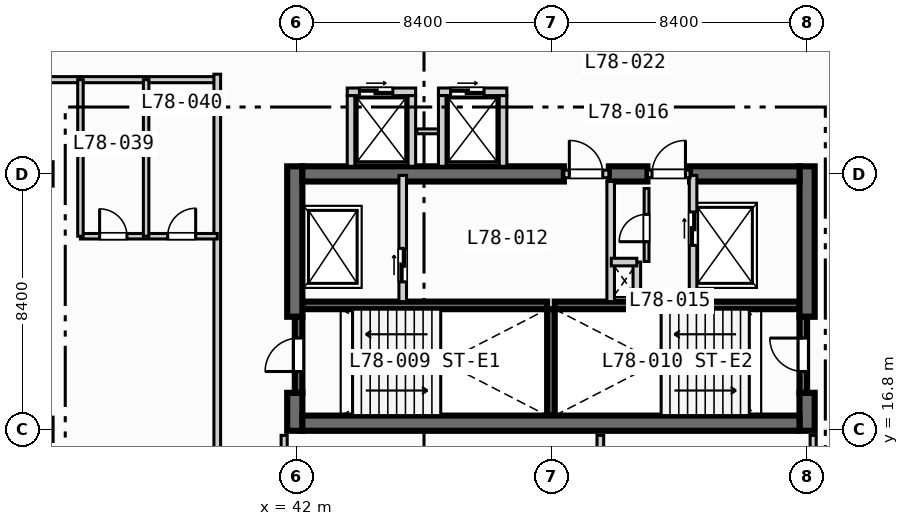
"""IFC4 building model, lengths in metres.
Left out: names, types, materials, properties, quantities, classifications, styles, units other than length and angle.
Written with IfcOpenShell. Run it as: python <this file> out.ifc"""

import sys

from ifc_helpers import new_model, si_unit, direction, frame, frame_2d, origin, place, context, subcontext, project, spatial, rectangle, extrude, element, fill, save


model = new_model("IFC4")
c1 = context("Model", 3, precision=1e-05, world=origin(), true_north=direction((0.0, 1.0)))
c2 = subcontext(c1, "Body", "Model", "MODEL_VIEW")
j1 = project(units=[si_unit("LENGTHUNIT", "METRE"), si_unit("PLANEANGLEUNIT", "RADIAN")], contexts=[c1])
p1 = place(None, origin())
s1 = spatial("IfcSite", under=j1, at=p1, CompositionType="ELEMENT")
p2 = place(p1, origin())
s2 = spatial("IfcBuilding", under=s1, at=p2, CompositionType="ELEMENT")
p3 = place(p2, frame((0.0, 0.0, 316.4)))
s3 = spatial("IfcBuildingStorey", under=s2, at=p3, CompositionType="ELEMENT", Elevation=316.4)
for number, where, z_axis, x_axis in (
    (1, (42.2, 20.875, 0.0), (0.0, 0.0, 1.0), (1.0, 0.0, 0.0)),
    (2, (50.5, 20.875, 0.0), (0.0, 0.0, 1.0), (1.0, 0.0, 0.0)),
):
    element("IfcWall", number, at=place(p3, frame(where, z_axis=z_axis, x_axis=x_axis)), inside=s3, PredefinedType="SOLIDWALL", context=c2, shape_type="SweptSolid", body=[
        extrude(rectangle(XDim=8.05, YDim=0.25, at=frame_2d((4.025, 0.0))), origin(), (0.0, 0.0, 1.0), 3.67),
    ])
p4 = place(p3, frame((50.375, 17.25, 0.0), z_axis=(0.0, 0.0, 1.0), x_axis=(0.0, 1.0, 0.0)))
e3 = element("IfcWall", 3, at=p4, inside=s3, PredefinedType="SOLIDWALL", context=c2, shape_type="SweptSolid", body=[
    extrude(rectangle(XDim=3.5, YDim=0.25, at=frame_2d((1.75, 0.0))), origin(), (0.0, 0.0, 1.0), 3.67),
])
p5 = place(p3, frame((41.95, 16.75, 0.0), z_axis=(0.0, 0.0, 1.0), x_axis=(0.0, 1.0, 0.0)))
e4 = element("IfcWall", 4, at=p5, inside=s3, PredefinedType="SHEAR", context=c2, shape_type="SweptSolid", body=[
    extrude(rectangle(XDim=1.25, YDim=0.5, at=frame_2d((0.625, 0.0))), origin(), (0.0, 0.0, 1.0), 3.67),
])
p6 = place(p3, frame((41.95, 20.5, 0.0), z_axis=(0.0, 0.0, 1.0), x_axis=(0.0, 1.0, 0.0)))
e5 = element("IfcWall", 5, at=p6, inside=s3, PredefinedType="SHEAR", context=c2, shape_type="SweptSolid", body=[
    extrude(rectangle(XDim=4.95, YDim=0.5, at=frame_2d((2.475, 0.0))), origin(), (0.0, 0.0, 1.0), 3.67),
])
p7 = place(p3, frame((58.8, 16.75, 0.0), z_axis=(0.0, 0.0, 1.0), x_axis=(0.0, 1.0, 0.0)))
e6 = element("IfcWall", 6, at=p7, inside=s3, PredefinedType="SHEAR", context=c2, shape_type="SweptSolid", body=[
    extrude(rectangle(XDim=1.25, YDim=0.5, at=frame_2d((0.625, 0.0))), origin(), (0.0, 0.0, 1.0), 3.67),
])
p8 = place(p3, frame((58.8, 20.5, 0.0), z_axis=(0.0, 0.0, 1.0), x_axis=(0.0, 1.0, 0.0)))
e7 = element("IfcWall", 7, at=p8, inside=s3, PredefinedType="SHEAR", context=c2, shape_type="SweptSolid", body=[
    extrude(rectangle(XDim=4.95, YDim=0.5, at=frame_2d((2.475, 0.0))), origin(), (0.0, 0.0, 1.0), 3.67),
])
p9 = place(p3, frame((42.2, 17.0, 0.0), z_axis=(0.0, 0.0, 1.0), x_axis=(1.0, 0.0, 0.0)))
e8 = element("IfcWall", 8, at=p9, inside=s3, PredefinedType="SHEAR", context=c2, shape_type="SweptSolid", body=[
    extrude(rectangle(XDim=16.35, YDim=0.5, at=frame_2d((8.175, 0.0))), origin(), (0.0, 0.0, 1.0), 3.67),
])
p10 = place(p3, frame((42.2, 25.2, 0.0), z_axis=(0.0, 0.0, 1.0), x_axis=(1.0, 0.0, 0.0)))
e9 = element("IfcWall", 9, at=p10, inside=s3, PredefinedType="SHEAR", context=c2, shape_type="SweptSolid", body=[
    extrude(rectangle(XDim=8.6, YDim=0.5, at=frame_2d((4.3, 0.0))), origin(), (0.0, 0.0, 1.0), 3.67),
])
p11 = place(p3, frame((52.28, 25.2, 0.0), z_axis=(0.0, 0.0, 1.0), x_axis=(1.0, 0.0, 0.0)))
e10 = element("IfcWall", 10, at=p11, inside=s3, PredefinedType="SHEAR", context=c2, shape_type="SweptSolid", body=[
    extrude(rectangle(XDim=1.27, YDim=0.5, at=frame_2d((0.635, 0.0))), origin(), (0.0, 0.0, 1.0), 3.67),
])
p12 = place(p3, frame((54.95, 25.2, 0.0), z_axis=(0.0, 0.0, 1.0), x_axis=(1.0, 0.0, 0.0)))
e11 = element("IfcWall", 11, at=p12, inside=s3, PredefinedType="SHEAR", context=c2, shape_type="SweptSolid", body=[
    extrude(rectangle(XDim=3.6, YDim=0.5, at=frame_2d((1.8, 0.0))), origin(), (0.0, 0.0, 1.0), 3.67),
])
p13 = place(p3, frame((42.075, 18.0, 0.0), z_axis=(0.0, 0.0, 1.0), x_axis=(0.0, 1.0, 0.0)))
e12 = element("IfcWall", 12, at=p13, inside=s3, PredefinedType="SOLIDWALL", context=c2, shape_type="SweptSolid", body=[
    extrude(rectangle(XDim=2.5, YDim=0.25, at=frame_2d((1.25, 0.0))), origin(), (0.0, 0.0, 1.0), 3.67),
])
p14 = place(p13, frame((0.7, 0.0, 0.0)))
e13 = element("IfcOpeningElement", 13, at=p14, cuts=e12, PredefinedType="OPENING", context=c2, shape_type="SweptSolid", body=[
    extrude(rectangle(XDim=1.1, YDim=2.15, at=frame_2d((0.55, 1.075))), frame((0.0, 0.135, 0.0), z_axis=(0.0, -1.0, 0.0), x_axis=(1.0, 0.0, 0.0)), (0.0, 0.0, 1.0), 0.27),
])
p15 = place(p3, frame((58.675, 18.0, 0.0), z_axis=(0.0, 0.0, 1.0), x_axis=(0.0, 1.0, 0.0)))
e14 = element("IfcWall", 14, at=p15, inside=s3, PredefinedType="SOLIDWALL", context=c2, shape_type="SweptSolid", body=[
    extrude(rectangle(XDim=2.5, YDim=0.25, at=frame_2d((1.25, 0.0))), origin(), (0.0, 0.0, 1.0), 3.67),
])
p16 = place(p15, frame((0.7, 0.0, 0.0)))
e15 = element("IfcOpeningElement", 15, at=p16, cuts=e14, PredefinedType="OPENING", context=c2, shape_type="SweptSolid", body=[
    extrude(rectangle(XDim=1.1, YDim=2.15, at=frame_2d((0.55, 1.075))), frame((0.0, 0.135, 0.0), z_axis=(0.0, -1.0, 0.0), x_axis=(1.0, 0.0, 0.0)), (0.0, 0.0, 1.0), 0.27),
])
p17 = place(p3, frame((45.5, 21.0, 0.0), z_axis=(0.0, 0.0, 1.0), x_axis=(0.0, 1.0, 0.0)))
e16 = element("IfcWall", 16, at=p17, inside=s3, PredefinedType="SOLIDWALL", context=c2, shape_type="SweptSolid", body=[
    extrude(rectangle(XDim=4.15, YDim=0.25, at=frame_2d((2.075, 0.0))), origin(), (0.0, 0.0, 1.0), 3.67),
])
p18 = place(p17, frame((0.65, 0.0, 0.0)))
e17 = element("IfcOpeningElement", 17, at=p18, cuts=e16, PredefinedType="OPENING", context=c2, shape_type="SweptSolid", body=[
    extrude(rectangle(XDim=1.1, YDim=2.15, at=frame_2d((0.55, 1.075))), frame((0.0, 0.135, 0.0), z_axis=(0.0, -1.0, 0.0), x_axis=(1.0, 0.0, 0.0)), (0.0, 0.0, 1.0), 0.27),
])
p19 = place(p3, frame((50.8, 25.2, 0.0), z_axis=(0.0, 0.0, 1.0), x_axis=(1.0, 0.0, 0.0)))
e18 = element("IfcWall", 18, at=p19, inside=s3, PredefinedType="SOLIDWALL", context=c2, shape_type="SweptSolid", body=[
    extrude(rectangle(XDim=1.48, YDim=0.25, at=frame_2d((0.74, 0.0))), origin(), (0.0, 0.0, 1.0), 3.67),
])
p20 = place(p19, frame((0.18, 0.0, 0.0)))
e19 = element("IfcOpeningElement", 19, at=p20, cuts=e18, PredefinedType="OPENING", context=c2, shape_type="SweptSolid", body=[
    extrude(rectangle(XDim=1.1, YDim=2.15, at=frame_2d((0.55, 1.075))), frame((0.0, 0.135, 0.0), z_axis=(0.0, -1.0, 0.0), x_axis=(1.0, 0.0, 0.0)), (0.0, 0.0, 1.0), 0.27),
])
p21 = place(p3, frame((52.34, 21.0, 0.0), z_axis=(0.0, 0.0, 1.0), x_axis=(0.0, 1.0, 0.0)))
e20 = element("IfcWall", 20, at=p21, inside=s3, PredefinedType="SOLIDWALL", context=c2, shape_type="SweptSolid", body=[
    extrude(rectangle(XDim=3.95, YDim=0.25, at=frame_2d((1.975, 0.0))), origin(), (0.0, 0.0, 1.0), 3.67),
])
p22 = place(p3, frame((55.05, 21.0, 0.0), z_axis=(0.0, 0.0, 1.0), x_axis=(0.0, 1.0, 0.0)))
e21 = element("IfcWall", 21, at=p22, inside=s3, PredefinedType="SOLIDWALL", context=c2, shape_type="SweptSolid", body=[
    extrude(rectangle(XDim=4.15, YDim=0.25, at=frame_2d((2.075, 0.0))), origin(), (0.0, 0.0, 1.0), 3.67),
])
p23 = place(p22, frame((1.85, 0.0, 0.0)))
e22 = element("IfcOpeningElement", 22, at=p23, cuts=e21, PredefinedType="OPENING", context=c2, shape_type="SweptSolid", body=[
    extrude(rectangle(XDim=1.1, YDim=2.15, at=frame_2d((0.55, 1.075))), frame((0.0, 0.135, 0.0), z_axis=(0.0, -1.0, 0.0), x_axis=(1.0, 0.0, 0.0)), (0.0, 0.0, 1.0), 0.27),
])
p24 = place(p3, frame((53.55, 25.2, 0.0), z_axis=(0.0, 0.0, 1.0), x_axis=(1.0, 0.0, 0.0)))
e23 = element("IfcWall", 23, at=p24, inside=s3, PredefinedType="SOLIDWALL", context=c2, shape_type="SweptSolid", body=[
    extrude(rectangle(XDim=1.4, YDim=0.25, at=frame_2d((0.7, 0.0))), origin(), (0.0, 0.0, 1.0), 3.67),
])
p25 = place(p24, frame((0.15, 0.0, 0.0)))
e24 = element("IfcOpeningElement", 24, at=p25, cuts=e23, PredefinedType="OPENING", context=c2, shape_type="SweptSolid", body=[
    extrude(rectangle(XDim=1.1, YDim=2.15, at=frame_2d((0.55, 1.075))), frame((0.0, 0.135, 0.0), z_axis=(0.0, -1.0, 0.0), x_axis=(1.0, 0.0, 0.0)), (0.0, 0.0, 1.0), 0.27),
])
p26 = place(p3, frame((53.2, 21.0, 0.0), z_axis=(0.0, 0.0, 1.0), x_axis=(0.0, 1.0, 0.0)))
e25 = element("IfcWall", 25, at=p26, inside=s3, PredefinedType="SOLIDWALL", context=c2, shape_type="SweptSolid", body=[
    extrude(rectangle(XDim=1.3, YDim=0.25, at=frame_2d((0.65, 0.0))), origin(), (0.0, 0.0, 1.0), 3.67),
])
p27 = place(p3, frame((52.36, 22.3, 0.0), z_axis=(0.0, 0.0, 1.0), x_axis=(1.0, 0.0, 0.0)))
e26 = element("IfcWall", 26, at=p27, inside=s3, PredefinedType="SOLIDWALL", context=c2, shape_type="SweptSolid", body=[
    extrude(rectangle(XDim=0.84, YDim=0.25, at=frame_2d((0.42, 0.0))), origin(), (0.0, 0.0, 1.0), 3.67),
])
p28 = place(p3, frame((53.52, 22.32, 0.0), z_axis=(0.0, 0.0, 1.0), x_axis=(0.0, 1.0, 0.0)))
e27 = element("IfcWall", 27, at=p28, inside=s3, PredefinedType="PARTITIONING", context=c2, shape_type="SweptSolid", body=[
    extrude(rectangle(XDim=2.4, YDim=0.16, at=frame_2d((1.2, 0.0))), origin(), (0.0, 0.0, 1.0), 3.67),
])
p29 = place(p28, frame((0.65, 0.0, 0.0)))
e28 = element("IfcOpeningElement", 28, at=p29, cuts=e27, PredefinedType="OPENING", context=c2, shape_type="SweptSolid", body=[
    extrude(rectangle(XDim=0.9, YDim=2.1, at=frame_2d((0.45, 1.05))), frame((0.0, 0.09, 0.0), z_axis=(0.0, -1.0, 0.0), x_axis=(1.0, 0.0, 0.0)), (0.0, 0.0, 1.0), 0.18),
])
p30 = place(p3, frame((43.675, 27.9, 0.0), z_axis=(0.0, 0.0, 1.0), x_axis=(1.0, 0.0, 0.0)))
e29 = element("IfcWall", 29, at=p30, inside=s3, PredefinedType="SOLIDWALL", context=c2, shape_type="SweptSolid", body=[
    extrude(rectangle(XDim=2.25, YDim=0.25, at=frame_2d((1.125, 0.0))), origin(), (0.0, 0.0, 1.0), 3.67),
])
p31 = place(p30, frame((0.4, 0.0, 0.0)))
e30 = element("IfcOpeningElement", 30, at=p31, cuts=e29, PredefinedType="OPENING", context=c2, shape_type="SweptSolid", body=[
    extrude(rectangle(XDim=1.1, YDim=2.15, at=frame_2d((0.55, 1.075))), frame((0.0, 0.135, 0.0), z_axis=(0.0, -1.0, 0.0), x_axis=(1.0, 0.0, 0.0)), (0.0, 0.0, 1.0), 0.27),
])
for number, where, z_axis, x_axis in (
    (31, (43.8, 25.45, 0.0), (0.0, 0.0, 1.0), (0.0, 1.0, 0.0)),
    (32, (45.8, 25.45, 0.0), (0.0, 0.0, 1.0), (0.0, 1.0, 0.0)),
):
    element("IfcWall", number, at=place(p3, frame(where, z_axis=z_axis, x_axis=x_axis)), inside=s3, PredefinedType="SOLIDWALL", context=c2, shape_type="SweptSolid", body=[
        extrude(rectangle(XDim=2.325, YDim=0.25, at=frame_2d((1.163, 0.0))), origin(), (0.0, 0.0, 1.0), 3.67),
    ])
p32 = place(p3, frame((45.96, 26.6, 0.0), z_axis=(0.0, 0.0, 1.0), x_axis=(1.0, 0.0, 0.0)))
e33 = element("IfcWall", 33, at=p32, inside=s3, PredefinedType="PARTITIONING", context=c2, shape_type="SweptSolid", body=[
    extrude(rectangle(XDim=0.88, YDim=0.16, at=frame_2d((0.44, 0.0))), origin(), (0.0, 0.0, 1.0), 3.67),
])
p33 = place(p3, frame((46.675, 27.9, 0.0), z_axis=(0.0, 0.0, 1.0), x_axis=(1.0, 0.0, 0.0)))
e34 = element("IfcWall", 34, at=p33, inside=s3, PredefinedType="SOLIDWALL", context=c2, shape_type="SweptSolid", body=[
    extrude(rectangle(XDim=2.25, YDim=0.25, at=frame_2d((1.125, 0.0))), origin(), (0.0, 0.0, 1.0), 3.67),
])
p34 = place(p33, frame((0.4, 0.0, 0.0)))
e35 = element("IfcOpeningElement", 35, at=p34, cuts=e34, PredefinedType="OPENING", context=c2, shape_type="SweptSolid", body=[
    extrude(rectangle(XDim=1.1, YDim=2.15, at=frame_2d((0.55, 1.075))), frame((0.0, 0.135, 0.0), z_axis=(0.0, -1.0, 0.0), x_axis=(1.0, 0.0, 0.0)), (0.0, 0.0, 1.0), 0.27),
])
for number, where, z_axis, x_axis in (
    (36, (46.8, 25.45, 0.0), (0.0, 0.0, 1.0), (0.0, 1.0, 0.0)),
    (37, (48.8, 25.45, 0.0), (0.0, 0.0, 1.0), (0.0, 1.0, 0.0)),
):
    element("IfcWall", number, at=place(p3, frame(where, z_axis=z_axis, x_axis=x_axis)), inside=s3, PredefinedType="SOLIDWALL", context=c2, shape_type="SweptSolid", body=[
        extrude(rectangle(XDim=2.325, YDim=0.25, at=frame_2d((1.163, 0.0))), origin(), (0.0, 0.0, 1.0), 3.67),
    ])
p35 = place(p3, frame((41.6, 8.65, 0.0), z_axis=(0.0, 0.0, 1.0), x_axis=(0.0, 1.0, 0.0)))
e38 = element("IfcWall", 38, at=p35, inside=s3, PredefinedType="PARTITIONING", context=c2, shape_type="SweptSolid", body=[
    extrude(rectangle(XDim=7.95, YDim=0.2, at=frame_2d((3.975, 0.0))), origin(), (0.0, 0.0, 1.0), 3.67),
])
p36 = place(p35, frame((2.2, 0.0, 0.0)))
e39 = element("IfcOpeningElement", 39, at=p36, cuts=e38, PredefinedType="OPENING", context=c2, shape_type="SweptSolid", body=[
    extrude(rectangle(XDim=0.92, YDim=2.1, at=frame_2d((0.46, 1.05))), frame((0.0, 0.11, 0.0), z_axis=(0.0, -1.0, 0.0), x_axis=(1.0, 0.0, 0.0)), (0.0, 0.0, 1.0), 0.22),
])
p37 = place(p3, frame((59.0, 8.65, 0.0), z_axis=(0.0, 0.0, 1.0), x_axis=(0.0, 1.0, 0.0)))
e40 = element("IfcWall", 40, at=p37, inside=s3, PredefinedType="PARTITIONING", context=c2, shape_type="SweptSolid", body=[
    extrude(rectangle(XDim=7.95, YDim=0.2, at=frame_2d((3.975, 0.0))), origin(), (0.0, 0.0, 1.0), 3.207),
])
p38 = place(p37, frame((2.2, 0.0, 0.0)))
e41 = element("IfcOpeningElement", 41, at=p38, cuts=e40, PredefinedType="OPENING", context=c2, shape_type="SweptSolid", body=[
    extrude(rectangle(XDim=0.92, YDim=2.1, at=frame_2d((0.46, 1.05))), frame((0.0, 0.11, 0.0), z_axis=(0.0, -1.0, 0.0), x_axis=(1.0, 0.0, 0.0)), (0.0, 0.0, 1.0), 0.22),
])
p39 = place(p3, frame((52.0, 8.65, 0.0), z_axis=(0.0, 0.0, 1.0), x_axis=(0.0, 1.0, 0.0)))
e42 = element("IfcWall", 42, at=p39, inside=s3, PredefinedType="PARTITIONING", context=c2, shape_type="SweptSolid", body=[
    extrude(rectangle(XDim=7.95, YDim=0.22, at=frame_2d((3.975, 0.0))), origin(), (0.0, 0.0, 1.0), 3.67),
])
p40 = place(p3, frame((11.8, 28.3, 0.0), z_axis=(0.0, 0.0, 1.0), x_axis=(1.0, 0.0, 0.0)))
e43 = element("IfcWall", 43, at=p40, inside=s3, PredefinedType="PARTITIONING", context=c2, shape_type="SweptSolid", body=[
    extrude(rectangle(XDim=27.6, YDim=0.2, at=frame_2d((13.8, 0.0))), origin(), (0.0, 0.0, 1.0), 3.67),
])
p41 = place(p40, frame((3.92, 0.0, 0.0)))
e44 = element("IfcOpeningElement", 44, at=p41, cuts=e43, PredefinedType="OPENING", context=c2, shape_type="SweptSolid", body=[
    extrude(rectangle(XDim=1.0, YDim=2.15, at=frame_2d((0.5, 1.075))), frame((0.0, 0.11, 0.0), z_axis=(0.0, -1.0, 0.0), x_axis=(1.0, 0.0, 0.0)), (0.0, 0.0, 1.0), 0.22),
])
p42 = place(p40, frame((12.57, 0.0, 0.0)))
e45 = element("IfcOpeningElement", 45, at=p42, cuts=e43, PredefinedType="OPENING", context=c2, shape_type="SweptSolid", body=[
    extrude(rectangle(XDim=1.0, YDim=2.15, at=frame_2d((0.5, 1.075))), frame((0.0, 0.11, 0.0), z_axis=(0.0, -1.0, 0.0), x_axis=(1.0, 0.0, 0.0)), (0.0, 0.0, 1.0), 0.22),
])
p43 = place(p40, frame((20.77, 0.0, 0.0)))
e46 = element("IfcOpeningElement", 46, at=p43, cuts=e43, PredefinedType="OPENING", context=c2, shape_type="SweptSolid", body=[
    extrude(rectangle(XDim=1.0, YDim=2.15, at=frame_2d((0.5, 1.075))), frame((0.0, 0.11, 0.0), z_axis=(0.0, -1.0, 0.0), x_axis=(1.0, 0.0, 0.0)), (0.0, 0.0, 1.0), 0.22),
])
p44 = place(p3, frame((39.4, 8.6, 0.0), z_axis=(0.0, 0.0, 1.0), x_axis=(0.0, 1.0, 0.0)))
e47 = element("IfcWall", 47, at=p44, inside=s3, PredefinedType="PARTITIONING", context=c2, shape_type="SweptSolid", body=[
    extrude(rectangle(XDim=19.88, YDim=0.22, at=frame_2d((9.94, 0.0))), origin(), (0.0, 0.0, 1.0), 3.67),
])
p45 = place(p3, frame((34.9, 23.15, 0.0), z_axis=(0.0, 0.0, 1.0), x_axis=(1.0, 0.0, 0.0)))
e48 = element("IfcWall", 48, at=p45, inside=s3, PredefinedType="PLUMBINGWALL", context=c2, shape_type="SweptSolid", body=[
    extrude(rectangle(XDim=4.5, YDim=0.18, at=frame_2d((2.25, 0.0))), origin(), (0.0, 0.0, 1.0), 3.67),
])
p46 = place(p45, frame((0.63, 0.0, 0.0)))
e49 = element("IfcOpeningElement", 49, at=p46, cuts=e48, PredefinedType="OPENING", context=c2, shape_type="SweptSolid", body=[
    extrude(rectangle(XDim=0.9, YDim=2.1, at=frame_2d((0.45, 1.05))), frame((0.0, 0.1, 0.0), z_axis=(0.0, -1.0, 0.0), x_axis=(1.0, 0.0, 0.0)), (0.0, 0.0, 1.0), 0.2),
])
p47 = place(p45, frame((2.87, 0.0, 0.0)))
e50 = element("IfcOpeningElement", 50, at=p47, cuts=e48, PredefinedType="OPENING", context=c2, shape_type="SweptSolid", body=[
    extrude(rectangle(XDim=0.92, YDim=2.1, at=frame_2d((0.46, 1.05))), frame((0.0, 0.1, 0.0), z_axis=(0.0, -1.0, 0.0), x_axis=(1.0, 0.0, 0.0)), (0.0, 0.0, 1.0), 0.2),
])
for number, where, z_axis, x_axis in (
    (51, (34.9, 23.15, 0.0), (0.0, 0.0, 1.0), (0.0, 1.0, 0.0)),
    (52, (37.06, 23.15, 0.0), (0.0, 0.0, 1.0), (0.0, 1.0, 0.0)),
):
    element("IfcWall", number, at=place(p3, frame(where, z_axis=z_axis, x_axis=x_axis)), inside=s3, PredefinedType="PLUMBINGWALL", context=c2, shape_type="SweptSolid", body=[
        extrude(rectangle(XDim=5.15, YDim=0.18, at=frame_2d((2.575, 0.0))), origin(), (0.0, 0.0, 1.0), 3.67),
    ])
p48 = place(p14, origin())
e53 = element("IfcDoor", 53, at=p48, inside=s3, OperationType="SINGLE_SWING_LEFT", PredefinedType="DOOR", context=c2, shape_type="SweptSolid", body=[
    extrude(rectangle(XDim=1.1, YDim=2.15, at=frame_2d((0.55, 1.075))), frame((0.0, 0.025, 0.0), z_axis=(0.0, -1.0, 0.0), x_axis=(1.0, 0.0, 0.0)), (0.0, 0.0, 1.0), 0.05),
])
fill(e13, e53)
p49 = place(p16, origin())
e54 = element("IfcDoor", 54, at=p49, inside=s3, OperationType="SINGLE_SWING_RIGHT", PredefinedType="DOOR", context=c2, shape_type="SweptSolid", body=[
    extrude(rectangle(XDim=1.1, YDim=2.15, at=frame_2d((0.55, 1.075))), frame((0.0, 0.025, 0.0), z_axis=(0.0, -1.0, 0.0), x_axis=(1.0, 0.0, 0.0)), (0.0, 0.0, 1.0), 0.05),
])
fill(e15, e54)
p50 = place(p18, origin())
e55 = element("IfcDoor", 55, at=p50, inside=s3, OperationType="SLIDING_TO_LEFT", PredefinedType="DOOR", context=c2, shape_type="SweptSolid", body=[
    extrude(rectangle(XDim=1.1, YDim=2.15, at=frame_2d((0.55, 1.075))), frame((0.0, 0.025, 0.0), z_axis=(0.0, -1.0, 0.0), x_axis=(1.0, 0.0, 0.0)), (0.0, 0.0, 1.0), 0.05),
])
fill(e17, e55)
p51 = place(p20, origin())
e56 = element("IfcDoor", 56, at=p51, inside=s3, OperationType="SINGLE_SWING_LEFT", PredefinedType="DOOR", context=c2, shape_type="SweptSolid", body=[
    extrude(rectangle(XDim=1.1, YDim=2.15, at=frame_2d((0.55, 1.075))), frame((0.0, 0.025, 0.0), z_axis=(0.0, -1.0, 0.0), x_axis=(1.0, 0.0, 0.0)), (0.0, 0.0, 1.0), 0.05),
])
fill(e19, e56)
p52 = place(p23, origin())
e57 = element("IfcDoor", 57, at=p52, inside=s3, OperationType="SLIDING_TO_LEFT", PredefinedType="DOOR", context=c2, shape_type="SweptSolid", body=[
    extrude(rectangle(XDim=1.1, YDim=2.15, at=frame_2d((0.55, 1.075))), frame((0.0, 0.025, 0.0), z_axis=(0.0, -1.0, 0.0), x_axis=(1.0, 0.0, 0.0)), (0.0, 0.0, 1.0), 0.05),
])
fill(e22, e57)
p53 = place(p25, origin())
e58 = element("IfcDoor", 58, at=p53, inside=s3, OperationType="SINGLE_SWING_RIGHT", PredefinedType="DOOR", context=c2, shape_type="SweptSolid", body=[
    extrude(rectangle(XDim=1.1, YDim=2.15, at=frame_2d((0.55, 1.075))), frame((0.0, 0.025, 0.0), z_axis=(0.0, -1.0, 0.0), x_axis=(1.0, 0.0, 0.0)), (0.0, 0.0, 1.0), 0.05),
])
fill(e24, e58)
p54 = place(p29, origin())
e59 = element("IfcDoor", 59, at=p54, inside=s3, OperationType="SINGLE_SWING_LEFT", PredefinedType="DOOR", context=c2, shape_type="SweptSolid", body=[
    extrude(rectangle(XDim=0.9, YDim=2.1, at=frame_2d((0.45, 1.05))), frame((0.0, 0.025, 0.0), z_axis=(0.0, -1.0, 0.0), x_axis=(1.0, 0.0, 0.0)), (0.0, 0.0, 1.0), 0.05),
])
fill(e28, e59)
p55 = place(p31, origin())
e60 = element("IfcDoor", 60, at=p55, inside=s3, OperationType="SLIDING_TO_LEFT", PredefinedType="DOOR", context=c2, shape_type="SweptSolid", body=[
    extrude(rectangle(XDim=1.1, YDim=2.15, at=frame_2d((0.55, 1.075))), frame((0.0, 0.025, 0.0), z_axis=(0.0, -1.0, 0.0), x_axis=(1.0, 0.0, 0.0)), (0.0, 0.0, 1.0), 0.05),
])
fill(e30, e60)
p56 = place(p34, origin())
e61 = element("IfcDoor", 61, at=p56, inside=s3, OperationType="SLIDING_TO_LEFT", PredefinedType="DOOR", context=c2, shape_type="SweptSolid", body=[
    extrude(rectangle(XDim=1.1, YDim=2.15, at=frame_2d((0.55, 1.075))), frame((0.0, 0.025, 0.0), z_axis=(0.0, -1.0, 0.0), x_axis=(1.0, 0.0, 0.0)), (0.0, 0.0, 1.0), 0.05),
])
fill(e35, e61)
p57 = place(p46, origin())
e62 = element("IfcDoor", 62, at=p57, inside=s3, OperationType="SINGLE_SWING_LEFT", PredefinedType="DOOR", context=c2, shape_type="SweptSolid", body=[
    extrude(rectangle(XDim=0.9, YDim=2.1, at=frame_2d((0.45, 1.05))), frame((0.0, 0.025, 0.0), z_axis=(0.0, -1.0, 0.0), x_axis=(1.0, 0.0, 0.0)), (0.0, 0.0, 1.0), 0.05),
])
fill(e49, e62)
p58 = place(p47, origin())
e63 = element("IfcDoor", 63, at=p58, inside=s3, OperationType="SINGLE_SWING_RIGHT", PredefinedType="DOOR", context=c2, shape_type="SweptSolid", body=[
    extrude(rectangle(XDim=0.92, YDim=2.1, at=frame_2d((0.46, 1.05))), frame((0.0, 0.025, 0.0), z_axis=(0.0, -1.0, 0.0), x_axis=(1.0, 0.0, 0.0)), (0.0, 0.0, 1.0), 0.05),
])
fill(e50, e63)
save(model, sys.argv[1])
